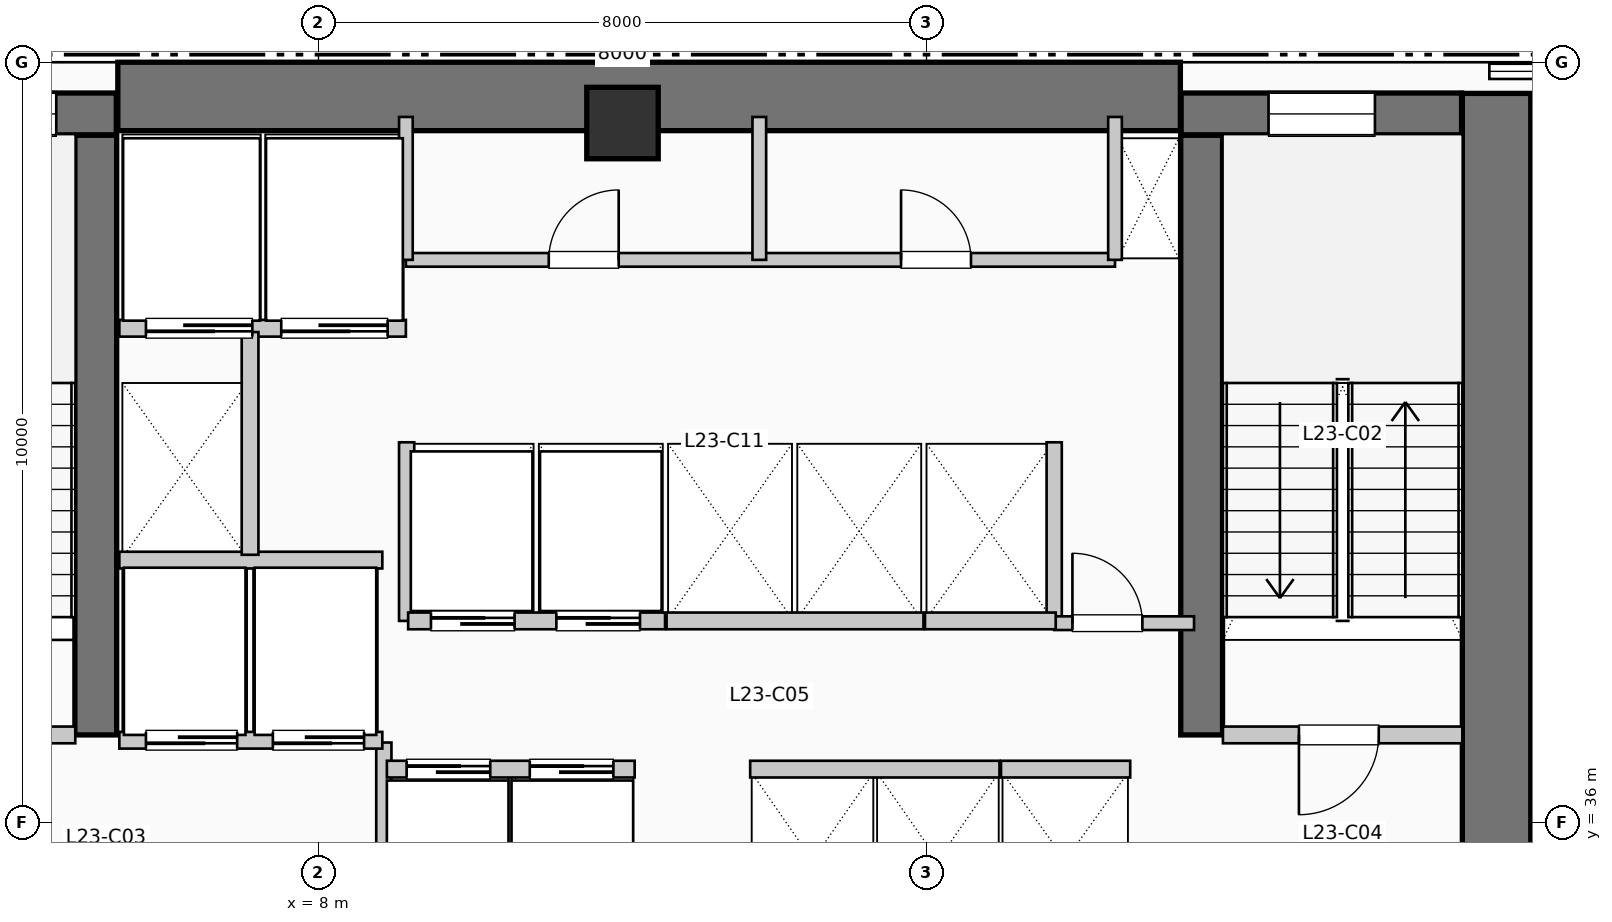
"""IFC4 building model, lengths in metres.
Left out: names, types, materials, properties, quantities, classifications, styles, units other than length and angle.
Written with IfcOpenShell. Run it as: python <this file> out.ifc"""

import sys

from ifc_helpers import new_model, si_unit, direction, frame, frame_2d, origin, origin_2d, place, context, subcontext, project, spatial, rectangle, extrude, element, fill, save


model = new_model("IFC4")
c1 = context("Model", 3, precision=1e-05, world=origin(), true_north=direction((0.0, 1.0)))
c2 = subcontext(c1, "Body", "Model", "MODEL_VIEW")
j1 = project(units=[si_unit("LENGTHUNIT", "METRE"), si_unit("PLANEANGLEUNIT", "RADIAN")], contexts=[c1])
p1 = place(None, origin())
s1 = spatial("IfcSite", under=j1, at=p1, CompositionType="ELEMENT")
p2 = place(p1, origin())
s2 = spatial("IfcBuilding", under=s1, at=p2, CompositionType="ELEMENT")
p3 = place(p2, frame((0.0, 0.0, 98.67)))
s3 = spatial("IfcBuildingStorey", under=s2, at=p3, CompositionType="ELEMENT", Elevation=98.67)
p4 = place(p3, frame((5.36, 45.55, 0.0), z_axis=(0.0, 0.0, 1.0), x_axis=(1.0, 0.0, 0.0)))
e1 = element("IfcWall", 1, at=p4, inside=s3, PredefinedType="SHEAR", context=c2, shape_type="SweptSolid", body=[
    extrude(rectangle(XDim=13.98, YDim=0.9, at=frame_2d((6.99, 0.0))), origin(), (0.0, 0.0, 1.0), 3.96),
])
p5 = place(p3, frame((23.5, 34.95, 0.0), z_axis=(0.0, 0.0, 1.0), x_axis=(0.0, 1.0, 0.0)))
e2 = element("IfcWall", 2, at=p5, inside=s3, PredefinedType="SHEAR", context=c2, shape_type="SweptSolid", body=[
    extrude(rectangle(XDim=10.64, YDim=0.9, at=frame_2d((5.32, 0.0))), origin(), (0.0, 0.0, 1.0), 3.96),
])
p6 = place(p3, frame((5.07, 37.15, 0.0), z_axis=(0.0, 0.0, 1.0), x_axis=(0.0, 1.0, 0.0)))
e3 = element("IfcWall", 3, at=p6, inside=s3, PredefinedType="SHEAR", context=c2, shape_type="SweptSolid", body=[
    extrude(rectangle(XDim=7.89, YDim=0.55, at=frame_2d((3.945, 0.0))), origin(), (0.0, 0.0, 1.0), 3.96),
])
p7 = place(p3, frame((1.1, 45.32, 0.0), z_axis=(0.0, 0.0, 1.0), x_axis=(1.0, 0.0, 0.0)))
e4 = element("IfcWall", 4, at=p7, inside=s3, PredefinedType="SHEAR", context=c2, shape_type="SweptSolid", body=[
    extrude(rectangle(XDim=4.24, YDim=0.55, at=frame_2d((2.12, 0.0))), origin(), (0.0, 0.0, 1.0), 3.96),
])
p8 = place(p7, frame((2.05, 0.0, 1.05)))
e5 = element("IfcOpeningElement", 5, at=p8, cuts=e4, PredefinedType="OPENING", context=c2, shape_type="SweptSolid", body=[
    extrude(rectangle(XDim=1.4, YDim=1.8, at=frame_2d((0.7, 0.9))), frame((0.0, 0.285, 0.0), z_axis=(0.0, -1.0, 0.0), x_axis=(1.0, 0.0, 0.0)), (0.0, 0.0, 1.0), 0.57),
])
p9 = place(p3, frame((19.62, 37.15, 0.0), z_axis=(0.0, 0.0, 1.0), x_axis=(0.0, 1.0, 0.0)))
e6 = element("IfcWall", 6, at=p9, inside=s3, PredefinedType="SHEAR", context=c2, shape_type="SweptSolid", body=[
    extrude(rectangle(XDim=7.89, YDim=0.55, at=frame_2d((3.945, 0.0))), origin(), (0.0, 0.0, 1.0), 3.96),
])
p10 = place(p3, frame((19.35, 45.32, 0.0), z_axis=(0.0, 0.0, 1.0), x_axis=(1.0, 0.0, 0.0)))
e7 = element("IfcWall", 7, at=p10, inside=s3, PredefinedType="SHEAR", context=c2, shape_type="SweptSolid", body=[
    extrude(rectangle(XDim=3.69, YDim=0.55, at=frame_2d((1.845, 0.0))), origin(), (0.0, 0.0, 1.0), 3.96),
])
p11 = place(p10, frame((1.15, 0.0, 1.05)))
e8 = element("IfcOpeningElement", 8, at=p11, cuts=e7, PredefinedType="OPENING", context=c2, shape_type="SweptSolid", body=[
    extrude(rectangle(XDim=1.4, YDim=1.8, at=frame_2d((0.7, 0.9))), frame((0.0, 0.285, 0.0), z_axis=(0.0, -1.0, 0.0), x_axis=(1.0, 0.0, 0.0)), (0.0, 0.0, 1.0), 0.57),
])
p12 = place(p3, frame((12.0, 45.2, 0.0), z_axis=(0.0, 0.0, 1.0), x_axis=(1.0, 0.0, 0.0)))
e9 = element("IfcColumn", 9, at=p12, inside=s3, PredefinedType="COLUMN", context=c2, shape_type="SweptSolid", body=[
    extrude(rectangle(XDim=0.94, YDim=0.94, at=origin_2d()), origin(), (0.0, 0.0, 1.0), 3.96),
])
p13 = place(p3, frame((1.65, 37.15, 0.0), z_axis=(0.0, 0.0, 1.0), x_axis=(1.0, 0.0, 0.0)))
e10 = element("IfcWall", 10, at=p13, inside=s3, PredefinedType="PARTITIONING", context=c2, shape_type="SweptSolid", body=[
    extrude(rectangle(XDim=3.15, YDim=0.22, at=frame_2d((1.575, 0.0))), origin(), (0.0, 0.0, 1.0), 3.71),
])
p14 = place(p13, frame((2.05, 0.0, 0.0), z_axis=(0.0, 0.0, 1.0), x_axis=(-1.0, 0.0, 0.0)))
e11 = element("IfcOpeningElement", 11, at=p14, cuts=e10, PredefinedType="OPENING", context=c2, shape_type="SweptSolid", body=[
    extrude(rectangle(XDim=1.05, YDim=2.15, at=frame_2d((0.525, 1.075))), frame((0.0, 0.12, 0.0), z_axis=(0.0, -1.0, 0.0), x_axis=(1.0, 0.0, 0.0)), (0.0, 0.0, 1.0), 0.24),
])
p15 = place(p3, frame((8.86, 34.55, 0.0), z_axis=(0.0, 0.0, 1.0), x_axis=(0.0, 1.0, 0.0)))
e12 = element("IfcWall", 12, at=p15, inside=s3, PredefinedType="PARTITIONING", context=c2, shape_type="SweptSolid", body=[
    extrude(rectangle(XDim=2.5, YDim=0.2, at=frame_2d((1.25, 0.0))), origin(), (0.0, 0.0, 1.0), 3.71),
])
p16 = place(p3, frame((19.9, 37.15, 0.0), z_axis=(0.0, 0.0, 1.0), x_axis=(1.0, 0.0, 0.0)))
e13 = element("IfcWall", 13, at=p16, inside=s3, PredefinedType="PARTITIONING", context=c2, shape_type="SweptSolid", body=[
    extrude(rectangle(XDim=3.15, YDim=0.22, at=frame_2d((1.575, 0.0))), origin(), (0.0, 0.0, 1.0), 3.71),
])
p17 = place(p16, frame((2.05, 0.0, 0.0), z_axis=(0.0, 0.0, 1.0), x_axis=(-1.0, 0.0, 0.0)))
e14 = element("IfcOpeningElement", 14, at=p17, cuts=e13, PredefinedType="OPENING", context=c2, shape_type="SweptSolid", body=[
    extrude(rectangle(XDim=1.05, YDim=2.15, at=frame_2d((0.525, 1.075))), frame((0.0, 0.12, 0.0), z_axis=(0.0, -1.0, 0.0), x_axis=(1.0, 0.0, 0.0)), (0.0, 0.0, 1.0), 0.24),
])
p18 = place(p3, frame((5.38, 37.08, 0.0), z_axis=(0.0, 0.0, 1.0), x_axis=(1.0, 0.0, 0.0)))
e15 = element("IfcWall", 15, at=p18, inside=s3, PredefinedType="PARTITIONING", context=c2, shape_type="SweptSolid", body=[
    extrude(rectangle(XDim=3.46, YDim=0.22, at=frame_2d((1.73, 0.0))), origin(), (0.0, 0.0, 1.0), 3.71),
])
p19 = place(p18, frame((1.55, 0.0, 0.0), z_axis=(0.0, 0.0, 1.0), x_axis=(-1.0, 0.0, 0.0)))
e16 = element("IfcOpeningElement", 16, at=p19, cuts=e15, PredefinedType="OPENING", context=c2, shape_type="SweptSolid", body=[
    extrude(rectangle(XDim=1.2, YDim=2.2, at=frame_2d((0.6, 1.1))), frame((0.0, 0.12, 0.0), z_axis=(0.0, -1.0, 0.0), x_axis=(1.0, 0.0, 0.0)), (0.0, 0.0, 1.0), 0.24),
])
p20 = place(p18, frame((3.22, 0.0, 0.0), z_axis=(0.0, 0.0, 1.0), x_axis=(-1.0, 0.0, 0.0)))
e17 = element("IfcOpeningElement", 17, at=p20, cuts=e15, PredefinedType="OPENING", context=c2, shape_type="SweptSolid", body=[
    extrude(rectangle(XDim=1.2, YDim=2.2, at=frame_2d((0.6, 1.1))), frame((0.0, 0.12, 0.0), z_axis=(0.0, -1.0, 0.0), x_axis=(1.0, 0.0, 0.0)), (0.0, 0.0, 1.0), 0.24),
])
p21 = place(p3, frame((5.38, 39.45, 0.0), z_axis=(0.0, 0.0, 1.0), x_axis=(1.0, 0.0, 0.0)))
e18 = element("IfcWall", 18, at=p21, inside=s3, PredefinedType="PARTITIONING", context=c2, shape_type="SweptSolid", body=[
    extrude(rectangle(XDim=3.46, YDim=0.22, at=frame_2d((1.73, 0.0))), origin(), (0.0, 0.0, 1.0), 3.71),
])
p22 = place(p3, frame((5.38, 42.5, 0.0), z_axis=(0.0, 0.0, 1.0), x_axis=(1.0, 0.0, 0.0)))
e19 = element("IfcWall", 19, at=p22, inside=s3, PredefinedType="PARTITIONING", context=c2, shape_type="SweptSolid", body=[
    extrude(rectangle(XDim=3.77, YDim=0.22, at=frame_2d((1.885, 0.0))), origin(), (0.0, 0.0, 1.0), 3.71),
])
p23 = place(p22, frame((1.75, 0.0, 0.0), z_axis=(0.0, 0.0, 1.0), x_axis=(-1.0, 0.0, 0.0)))
e20 = element("IfcOpeningElement", 20, at=p23, cuts=e19, PredefinedType="OPENING", context=c2, shape_type="SweptSolid", body=[
    extrude(rectangle(XDim=1.4, YDim=2.2, at=frame_2d((0.7, 1.1))), frame((0.0, 0.12, 0.0), z_axis=(0.0, -1.0, 0.0), x_axis=(1.0, 0.0, 0.0)), (0.0, 0.0, 1.0), 0.24),
])
p24 = place(p22, frame((3.53, 0.0, 0.0), z_axis=(0.0, 0.0, 1.0), x_axis=(-1.0, 0.0, 0.0)))
e21 = element("IfcOpeningElement", 21, at=p24, cuts=e19, PredefinedType="OPENING", context=c2, shape_type="SweptSolid", body=[
    extrude(rectangle(XDim=1.4, YDim=2.2, at=frame_2d((0.7, 1.1))), frame((0.0, 0.12, 0.0), z_axis=(0.0, -1.0, 0.0), x_axis=(1.0, 0.0, 0.0)), (0.0, 0.0, 1.0), 0.24),
])
p25 = place(p3, frame((7.1, 39.52, 0.0), z_axis=(0.0, 0.0, 1.0), x_axis=(0.0, 1.0, 0.0)))
e22 = element("IfcWall", 22, at=p25, inside=s3, PredefinedType="PARTITIONING", context=c2, shape_type="SweptSolid", body=[
    extrude(rectangle(XDim=2.93, YDim=0.22, at=frame_2d((1.465, 0.0))), origin(), (0.0, 0.0, 1.0), 3.71),
])
for number, where, z_axis, x_axis in (
    (23, (9.16, 38.65, 0.0), (0.0, 0.0, 1.0), (0.0, 1.0, 0.0)),
    (24, (17.68, 38.65, 0.0), (0.0, 0.0, 1.0), (0.0, 1.0, 0.0)),
):
    element("IfcWall", number, at=place(p3, frame(where, z_axis=z_axis, x_axis=x_axis)), inside=s3, PredefinedType="PARTITIONING", context=c2, shape_type="SweptSolid", body=[
        extrude(rectangle(XDim=2.35, YDim=0.2, at=frame_2d((1.175, 0.0))), origin(), (0.0, 0.0, 1.0), 3.71),
    ])
p26 = place(p3, frame((17.68, 38.62, 0.0), z_axis=(0.0, 0.0, 1.0), x_axis=(1.0, 0.0, 0.0)))
e25 = element("IfcWall", 25, at=p26, inside=s3, PredefinedType="PARTITIONING", context=c2, shape_type="SweptSolid", body=[
    extrude(rectangle(XDim=1.84, YDim=0.18, at=frame_2d((0.92, 0.0))), origin(), (0.0, 0.0, 1.0), 3.71),
])
p27 = place(p26, frame((0.24, 0.0, 0.0)))
e26 = element("IfcOpeningElement", 26, at=p27, cuts=e25, PredefinedType="OPENING", context=c2, shape_type="SweptSolid", body=[
    extrude(rectangle(XDim=0.92, YDim=2.1, at=frame_2d((0.46, 1.05))), frame((0.0, 0.1, 0.0), z_axis=(0.0, -1.0, 0.0), x_axis=(1.0, 0.0, 0.0)), (0.0, 0.0, 1.0), 0.2),
])
p28 = place(p3, frame((8.9, 36.7, 0.0), z_axis=(0.0, 0.0, 1.0), x_axis=(1.0, 0.0, 0.0)))
e27 = element("IfcWall", 27, at=p28, inside=s3, PredefinedType="PARTITIONING", context=c2, shape_type="SweptSolid", body=[
    extrude(rectangle(XDim=3.26, YDim=0.22, at=frame_2d((1.63, 0.0))), origin(), (0.0, 0.0, 1.0), 3.71),
])
p29 = place(p28, frame((0.26, 0.0, 0.0)))
e28 = element("IfcOpeningElement", 28, at=p29, cuts=e27, PredefinedType="OPENING", context=c2, shape_type="SweptSolid", body=[
    extrude(rectangle(XDim=1.1, YDim=2.2, at=frame_2d((0.55, 1.1))), frame((0.0, 0.12, 0.0), z_axis=(0.0, -1.0, 0.0), x_axis=(1.0, 0.0, 0.0)), (0.0, 0.0, 1.0), 0.24),
])
p30 = place(p28, frame((1.88, 0.0, 0.0)))
e29 = element("IfcOpeningElement", 29, at=p30, cuts=e27, PredefinedType="OPENING", context=c2, shape_type="SweptSolid", body=[
    extrude(rectangle(XDim=1.1, YDim=2.2, at=frame_2d((0.55, 1.1))), frame((0.0, 0.12, 0.0), z_axis=(0.0, -1.0, 0.0), x_axis=(1.0, 0.0, 0.0)), (0.0, 0.0, 1.0), 0.24),
])
p31 = place(p3, frame((9.18, 38.65, 0.0), z_axis=(0.0, 0.0, 1.0), x_axis=(1.0, 0.0, 0.0)))
e30 = element("IfcWall", 30, at=p31, inside=s3, PredefinedType="PARTITIONING", context=c2, shape_type="SweptSolid", body=[
    extrude(rectangle(XDim=3.38, YDim=0.22, at=frame_2d((1.69, 0.0))), origin(), (0.0, 0.0, 1.0), 3.71),
])
p32 = place(p31, frame((0.3, 0.0, 0.0)))
e31 = element("IfcOpeningElement", 31, at=p32, cuts=e30, PredefinedType="OPENING", context=c2, shape_type="SweptSolid", body=[
    extrude(rectangle(XDim=1.1, YDim=2.2, at=frame_2d((0.55, 1.1))), frame((0.0, 0.12, 0.0), z_axis=(0.0, -1.0, 0.0), x_axis=(1.0, 0.0, 0.0)), (0.0, 0.0, 1.0), 0.24),
])
p33 = place(p31, frame((1.95, 0.0, 0.0)))
e32 = element("IfcOpeningElement", 32, at=p33, cuts=e30, PredefinedType="OPENING", context=c2, shape_type="SweptSolid", body=[
    extrude(rectangle(XDim=1.1, YDim=2.2, at=frame_2d((0.55, 1.1))), frame((0.0, 0.12, 0.0), z_axis=(0.0, -1.0, 0.0), x_axis=(1.0, 0.0, 0.0)), (0.0, 0.0, 1.0), 0.24),
])
p34 = place(p3, frame((13.68, 36.7, 0.0), z_axis=(0.0, 0.0, 1.0), x_axis=(1.0, 0.0, 0.0)))
e33 = element("IfcWall", 33, at=p34, inside=s3, PredefinedType="PARTITIONING", context=c2, shape_type="SweptSolid", body=[
    extrude(rectangle(XDim=3.28, YDim=0.22, at=frame_2d((1.64, 0.0))), origin(), (0.0, 0.0, 1.0), 3.71),
])
p35 = place(p3, frame((12.58, 38.65, 0.0), z_axis=(0.0, 0.0, 1.0), x_axis=(1.0, 0.0, 0.0)))
e34 = element("IfcWall", 34, at=p35, inside=s3, PredefinedType="PARTITIONING", context=c2, shape_type="SweptSolid", body=[
    extrude(rectangle(XDim=3.38, YDim=0.22, at=frame_2d((1.69, 0.0))), origin(), (0.0, 0.0, 1.0), 3.71),
])
p36 = place(p3, frame((16.98, 36.7, 0.0), z_axis=(0.0, 0.0, 1.0), x_axis=(1.0, 0.0, 0.0)))
e35 = element("IfcWall", 35, at=p36, inside=s3, PredefinedType="PARTITIONING", context=c2, shape_type="SweptSolid", body=[
    extrude(rectangle(XDim=1.7, YDim=0.22, at=frame_2d((0.85, 0.0))), origin(), (0.0, 0.0, 1.0), 3.71),
])
p37 = place(p3, frame((15.98, 38.65, 0.0), z_axis=(0.0, 0.0, 1.0), x_axis=(1.0, 0.0, 0.0)))
e36 = element("IfcWall", 36, at=p37, inside=s3, PredefinedType="PARTITIONING", context=c2, shape_type="SweptSolid", body=[
    extrude(rectangle(XDim=1.72, YDim=0.22, at=frame_2d((0.86, 0.0))), origin(), (0.0, 0.0, 1.0), 3.71),
])
p38 = place(p3, frame((9.15, 43.4, 0.0), z_axis=(0.0, 0.0, 1.0), x_axis=(1.0, 0.0, 0.0)))
e37 = element("IfcWall", 37, at=p38, inside=s3, PredefinedType="PLUMBINGWALL", context=c2, shape_type="SweptSolid", body=[
    extrude(rectangle(XDim=9.33, YDim=0.18, at=frame_2d((4.665, 0.0))), origin(), (0.0, 0.0, 1.0), 3.71),
])
p39 = place(p38, frame((1.88, 0.0, 0.0)))
e38 = element("IfcOpeningElement", 38, at=p39, cuts=e37, PredefinedType="OPENING", context=c2, shape_type="SweptSolid", body=[
    extrude(rectangle(XDim=0.92, YDim=2.1, at=frame_2d((0.46, 1.05))), frame((0.0, 0.1, 0.0), z_axis=(0.0, -1.0, 0.0), x_axis=(1.0, 0.0, 0.0)), (0.0, 0.0, 1.0), 0.2),
])
p40 = place(p38, frame((6.515, 0.0, 0.0)))
e39 = element("IfcOpeningElement", 39, at=p40, cuts=e37, PredefinedType="OPENING", context=c2, shape_type="SweptSolid", body=[
    extrude(rectangle(XDim=0.92, YDim=2.1, at=frame_2d((0.46, 1.05))), frame((0.0, 0.1, 0.0), z_axis=(0.0, -1.0, 0.0), x_axis=(1.0, 0.0, 0.0)), (0.0, 0.0, 1.0), 0.2),
])
for number, where, z_axis, x_axis in (
    (40, (9.15, 43.4, 0.0), (0.0, 0.0, 1.0), (0.0, 1.0, 0.0)),
    (41, (18.48, 43.4, 0.0), (0.0, 0.0, 1.0), (0.0, 1.0, 0.0)),
    (42, (13.8, 43.4, 0.0), (0.0, 0.0, 1.0), (0.0, 1.0, 0.0)),
):
    element("IfcWall", number, at=place(p3, frame(where, z_axis=z_axis, x_axis=x_axis)), inside=s3, PredefinedType="PLUMBINGWALL", context=c2, shape_type="SweptSolid", body=[
        extrude(rectangle(XDim=1.88, YDim=0.18, at=frame_2d((0.94, 0.0))), origin(), (0.0, 0.0, 1.0), 3.71),
    ])
p41 = place(p8, origin())
e43 = element("IfcWindow", 43, at=p41, inside=s3, PartitioningType="SINGLE_PANEL", PredefinedType="WINDOW", context=c2, shape_type="SweptSolid", body=[
    extrude(rectangle(XDim=1.4, YDim=1.8, at=frame_2d((0.7, 0.9))), frame((0.0, 0.03, 0.0), z_axis=(0.0, -1.0, 0.0), x_axis=(1.0, 0.0, 0.0)), (0.0, 0.0, 1.0), 0.06),
])
fill(e5, e43)
p42 = place(p11, origin())
e44 = element("IfcWindow", 44, at=p42, inside=s3, PartitioningType="SINGLE_PANEL", PredefinedType="WINDOW", context=c2, shape_type="SweptSolid", body=[
    extrude(rectangle(XDim=1.4, YDim=1.8, at=frame_2d((0.7, 0.9))), frame((0.0, 0.03, 0.0), z_axis=(0.0, -1.0, 0.0), x_axis=(1.0, 0.0, 0.0)), (0.0, 0.0, 1.0), 0.06),
])
fill(e8, e44)
p43 = place(p17, origin())
e45 = element("IfcDoor", 45, at=p43, inside=s3, OperationType="SINGLE_SWING_LEFT", PredefinedType="DOOR", context=c2, shape_type="SweptSolid", body=[
    extrude(rectangle(XDim=1.05, YDim=2.15, at=frame_2d((0.525, 1.075))), frame((0.0, 0.025, 0.0), z_axis=(0.0, -1.0, 0.0), x_axis=(1.0, 0.0, 0.0)), (0.0, 0.0, 1.0), 0.05),
])
fill(e14, e45)
p44 = place(p19, origin())
e46 = element("IfcDoor", 46, at=p44, inside=s3, OperationType="SLIDING_TO_RIGHT", PredefinedType="DOOR", context=c2, shape_type="SweptSolid", body=[
    extrude(rectangle(XDim=1.2, YDim=2.2, at=frame_2d((0.6, 1.1))), frame((0.0, 0.025, 0.0), z_axis=(0.0, -1.0, 0.0), x_axis=(1.0, 0.0, 0.0)), (0.0, 0.0, 1.0), 0.05),
])
fill(e16, e46)
p45 = place(p20, origin())
e47 = element("IfcDoor", 47, at=p45, inside=s3, OperationType="SLIDING_TO_RIGHT", PredefinedType="DOOR", context=c2, shape_type="SweptSolid", body=[
    extrude(rectangle(XDim=1.2, YDim=2.2, at=frame_2d((0.6, 1.1))), frame((0.0, 0.025, 0.0), z_axis=(0.0, -1.0, 0.0), x_axis=(1.0, 0.0, 0.0)), (0.0, 0.0, 1.0), 0.05),
])
fill(e17, e47)
p46 = place(p23, origin())
e48 = element("IfcDoor", 48, at=p46, inside=s3, OperationType="SLIDING_TO_LEFT", PredefinedType="DOOR", context=c2, shape_type="SweptSolid", body=[
    extrude(rectangle(XDim=1.4, YDim=2.2, at=frame_2d((0.7, 1.1))), frame((0.0, 0.025, 0.0), z_axis=(0.0, -1.0, 0.0), x_axis=(1.0, 0.0, 0.0)), (0.0, 0.0, 1.0), 0.05),
])
fill(e20, e48)
p47 = place(p24, origin())
e49 = element("IfcDoor", 49, at=p47, inside=s3, OperationType="SLIDING_TO_LEFT", PredefinedType="DOOR", context=c2, shape_type="SweptSolid", body=[
    extrude(rectangle(XDim=1.4, YDim=2.2, at=frame_2d((0.7, 1.1))), frame((0.0, 0.025, 0.0), z_axis=(0.0, -1.0, 0.0), x_axis=(1.0, 0.0, 0.0)), (0.0, 0.0, 1.0), 0.05),
])
fill(e21, e49)
p48 = place(p27, origin())
e50 = element("IfcDoor", 50, at=p48, inside=s3, OperationType="SINGLE_SWING_LEFT", PredefinedType="DOOR", context=c2, shape_type="SweptSolid", body=[
    extrude(rectangle(XDim=0.92, YDim=2.1, at=frame_2d((0.46, 1.05))), frame((0.0, 0.025, 0.0), z_axis=(0.0, -1.0, 0.0), x_axis=(1.0, 0.0, 0.0)), (0.0, 0.0, 1.0), 0.05),
])
fill(e26, e50)
p49 = place(p29, origin())
e51 = element("IfcDoor", 51, at=p49, inside=s3, OperationType="SLIDING_TO_LEFT", PredefinedType="DOOR", context=c2, shape_type="SweptSolid", body=[
    extrude(rectangle(XDim=1.1, YDim=2.2, at=frame_2d((0.55, 1.1))), frame((0.0, 0.025, 0.0), z_axis=(0.0, -1.0, 0.0), x_axis=(1.0, 0.0, 0.0)), (0.0, 0.0, 1.0), 0.05),
])
fill(e28, e51)
p50 = place(p30, origin())
e52 = element("IfcDoor", 52, at=p50, inside=s3, OperationType="SLIDING_TO_LEFT", PredefinedType="DOOR", context=c2, shape_type="SweptSolid", body=[
    extrude(rectangle(XDim=1.1, YDim=2.2, at=frame_2d((0.55, 1.1))), frame((0.0, 0.025, 0.0), z_axis=(0.0, -1.0, 0.0), x_axis=(1.0, 0.0, 0.0)), (0.0, 0.0, 1.0), 0.05),
])
fill(e29, e52)
p51 = place(p32, origin())
e53 = element("IfcDoor", 53, at=p51, inside=s3, OperationType="SLIDING_TO_LEFT", PredefinedType="DOOR", context=c2, shape_type="SweptSolid", body=[
    extrude(rectangle(XDim=1.1, YDim=2.2, at=frame_2d((0.55, 1.1))), frame((0.0, 0.025, 0.0), z_axis=(0.0, -1.0, 0.0), x_axis=(1.0, 0.0, 0.0)), (0.0, 0.0, 1.0), 0.05),
])
fill(e31, e53)
p52 = place(p33, origin())
e54 = element("IfcDoor", 54, at=p52, inside=s3, OperationType="SLIDING_TO_LEFT", PredefinedType="DOOR", context=c2, shape_type="SweptSolid", body=[
    extrude(rectangle(XDim=1.1, YDim=2.2, at=frame_2d((0.55, 1.1))), frame((0.0, 0.025, 0.0), z_axis=(0.0, -1.0, 0.0), x_axis=(1.0, 0.0, 0.0)), (0.0, 0.0, 1.0), 0.05),
])
fill(e32, e54)
p53 = place(p39, origin())
e55 = element("IfcDoor", 55, at=p53, inside=s3, OperationType="SINGLE_SWING_RIGHT", PredefinedType="DOOR", context=c2, shape_type="SweptSolid", body=[
    extrude(rectangle(XDim=0.92, YDim=2.1, at=frame_2d((0.46, 1.05))), frame((0.0, 0.025, 0.0), z_axis=(0.0, -1.0, 0.0), x_axis=(1.0, 0.0, 0.0)), (0.0, 0.0, 1.0), 0.05),
])
fill(e38, e55)
p54 = place(p40, origin())
e56 = element("IfcDoor", 56, at=p54, inside=s3, OperationType="SINGLE_SWING_LEFT", PredefinedType="DOOR", context=c2, shape_type="SweptSolid", body=[
    extrude(rectangle(XDim=0.92, YDim=2.1, at=frame_2d((0.46, 1.05))), frame((0.0, 0.025, 0.0), z_axis=(0.0, -1.0, 0.0), x_axis=(1.0, 0.0, 0.0)), (0.0, 0.0, 1.0), 0.05),
])
fill(e39, e56)
save(model, sys.argv[1])
